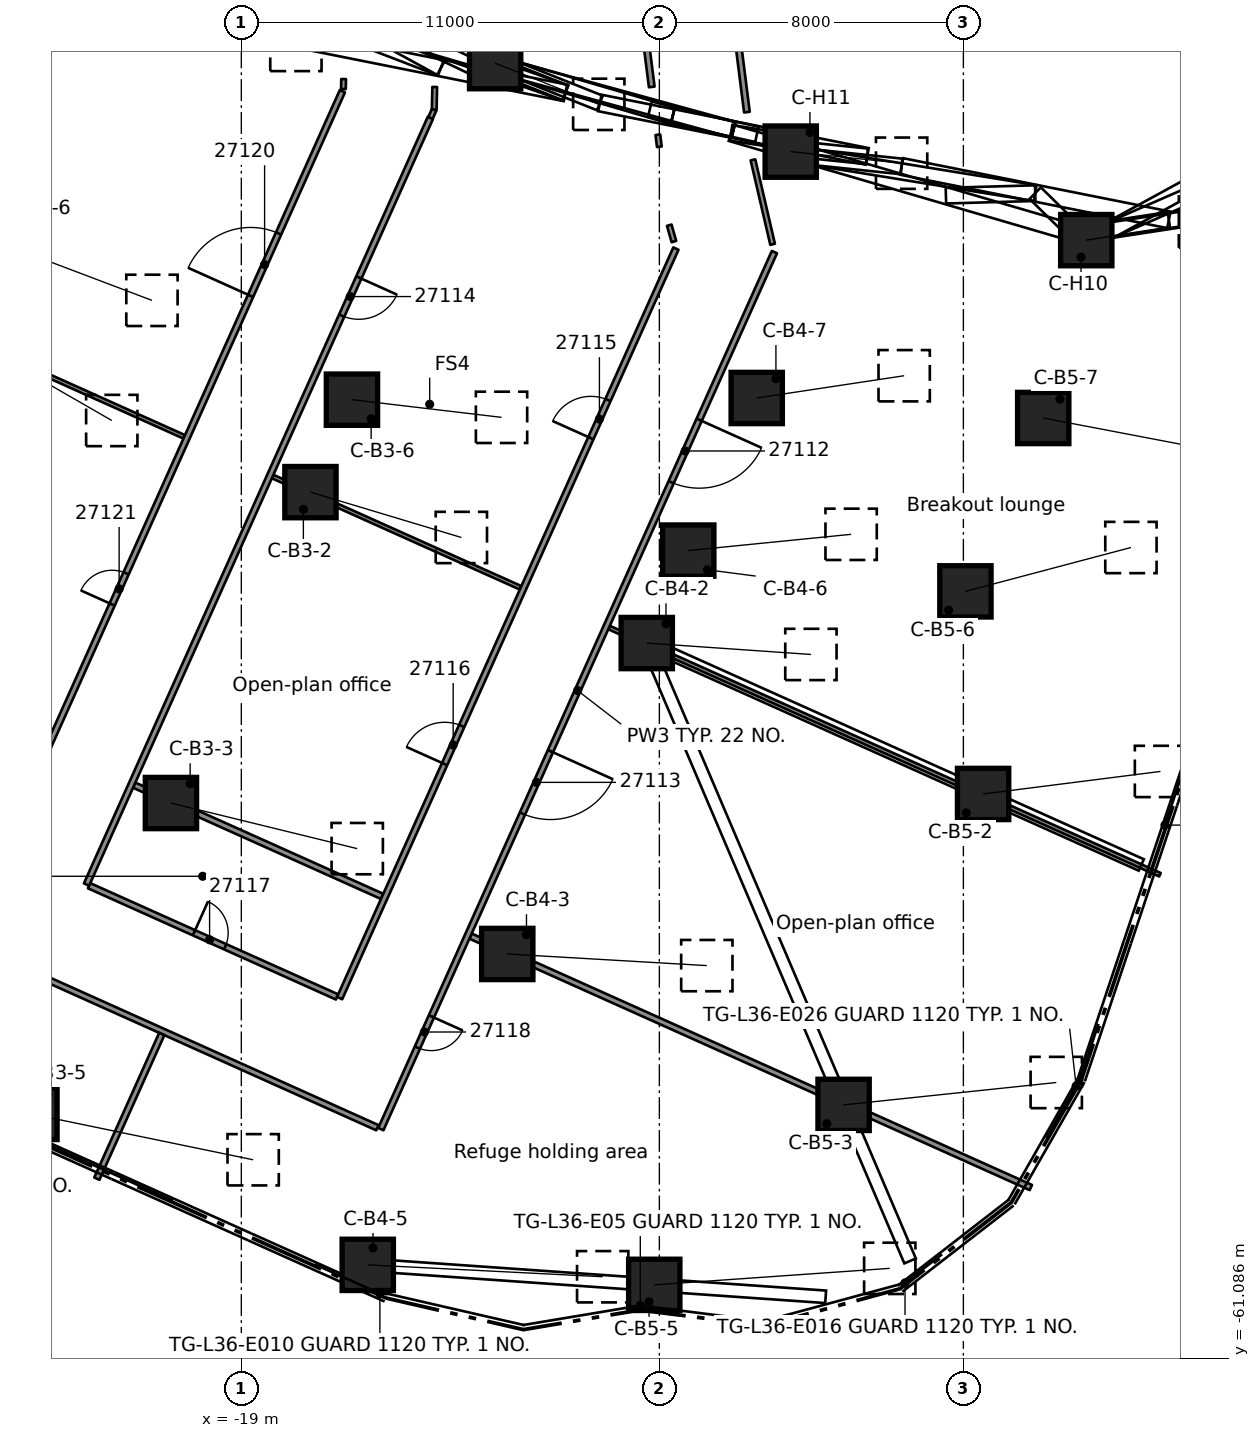
"""IFC4 building model, lengths in metres.
Left out: names, types, materials, properties, quantities, classifications, styles, units other than length and angle.
Written with IfcOpenShell. Run it as: python <this file> out.ifc"""

import sys

from ifc_helpers import new_model, si_unit, direction, frame, frame_2d, origin, origin_2d, place, context, subcontext, project, spatial, rectangle, extrude, element, fill, save


model = new_model("IFC4")
c1 = context("Model", 3, precision=1e-05, world=origin(), true_north=direction((0.0, 1.0)))
c2 = subcontext(c1, "Body", "Model", "MODEL_VIEW")
j1 = project(units=[si_unit("LENGTHUNIT", "METRE"), si_unit("PLANEANGLEUNIT", "RADIAN")], contexts=[c1])
p1 = place(None, origin())
s1 = spatial("IfcSite", under=j1, at=p1, CompositionType="ELEMENT")
p2 = place(p1, origin())
s2 = spatial("IfcBuilding", under=s1, at=p2, CompositionType="ELEMENT")
p3 = place(p2, frame((0.0, 0.0, 141.2)))
s3 = spatial("IfcBuildingStorey", under=s2, at=p3, CompositionType="ELEMENT", Elevation=141.2)
p4 = place(p3, frame((-26.031, -34.318, 0.527), z_axis=(0.676490609921, -0.389588552923, 0.624964970314), x_axis=(0.499054836626, 0.866570406857, 0.0)))
e1 = element("IfcColumn", 1, at=p4, inside=s3, PredefinedType="COLUMN", context=c2, shape_type="SweptSolid", body=[
    extrude(rectangle(XDim=1.35, YDim=1.35, at=origin_2d()), origin(), (0.0, 0.0, 1.0), 5.354),
])
p5 = place(p3, frame((-24.939, -31.885, 0.506), z_axis=(0.700899962867, -0.265342063263, 0.66206708989), x_axis=(0.354051617302, 0.935225883028, 0.0)))
e2 = element("IfcColumn", 2, at=p5, inside=s3, PredefinedType="COLUMN", context=c2, shape_type="SweptSolid", body=[
    extrude(rectangle(XDim=1.35, YDim=1.35, at=origin_2d()), origin(), (0.0, 0.0, 1.0), 5.118),
])
p6 = place(p3, frame((-17.181, -38.289, 0.525), z_axis=(0.744966037847, -0.223787522959, 0.628446296053), x_axis=(0.287698999339, 0.957720880935, 0.0)))
e3 = element("IfcColumn", 3, at=p6, inside=s3, PredefinedType="COLUMN", context=c2, shape_type="SweptSolid", body=[
    extrude(rectangle(XDim=1.35, YDim=1.35, at=origin_2d()), origin(), (0.0, 0.0, 1.0), 5.33),
])
p7 = place(p3, frame((-20.852, -46.469, 0.567), z_axis=(0.815419612681, -0.199600946079, 0.543369411707), x_axis=(0.237763481312, 0.971323080625, 0.0)))
e4 = element("IfcColumn", 4, at=p7, inside=s3, PredefinedType="COLUMN", context=c2, shape_type="SweptSolid", body=[
    extrude(rectangle(XDim=1.35, YDim=1.35, at=origin_2d()), origin(), (0.0, 0.0, 1.0), 6.012),
])
p8 = place(p3, frame((-24.523, -54.65, 0.594), z_axis=(0.862005289153, -0.178201629077, 0.474543002126), x_axis=(0.202448404588, 0.979292930374, 0.0)))
e5 = element("IfcColumn", 5, at=p8, inside=s3, PredefinedType="COLUMN", context=c2, shape_type="SweptSolid", body=[
    extrude(rectangle(XDim=1.35, YDim=1.35, at=origin_2d()), origin(), (0.0, 0.0, 1.0), 6.768),
])
p9 = place(p3, frame((-16.089, -35.856, 0.514), z_axis=(0.756400050479, -0.089377378499, 0.647974264804), x_axis=(0.117345163005, 0.993091190536, 0.0)))
e6 = element("IfcColumn", 6, at=p9, inside=s3, PredefinedType="COLUMN", context=c2, shape_type="SweptSolid", body=[
    extrude(rectangle(XDim=1.35, YDim=1.35, at=origin_2d()), origin(), (0.0, 0.0, 1.0), 5.204),
])
p10 = place(p3, frame((-8.331, -42.26, 0.535), z_axis=(0.790766933588, -0.05493485735, 0.60964728999), x_axis=(0.069303320034, 0.997595634429, 0.0)))
e7 = element("IfcColumn", 7, at=p10, inside=s3, PredefinedType="COLUMN", context=c2, shape_type="SweptSolid", body=[
    extrude(rectangle(XDim=1.35, YDim=1.35, at=origin_2d()), origin(), (0.0, 0.0, 1.0), 5.462),
])
p11 = place(p3, frame((-12.002, -50.441, 0.574), z_axis=(0.84914253523, -0.049508310358, 0.525838266075), x_axis=(0.0582050414, 0.998304649471, 0.0)))
e8 = element("IfcColumn", 8, at=p11, inside=s3, PredefinedType="COLUMN", context=c2, shape_type="SweptSolid", body=[
    extrude(rectangle(XDim=1.35, YDim=1.35, at=origin_2d()), origin(), (0.0, 0.0, 1.0), 6.184),
])
p12 = place(p3, frame((-15.673, -58.621, 0.6), z_axis=(0.887129480144, -0.044913513685, 0.459330013986), x_axis=(0.050563152588, 0.998720865708, 0.0)))
e9 = element("IfcColumn", 9, at=p12, inside=s3, PredefinedType="COLUMN", context=c2, shape_type="SweptSolid", body=[
    extrude(rectangle(XDim=1.35, YDim=1.35, at=origin_2d()), origin(), (0.0, 0.0, 1.0), 6.969),
])
p13 = place(p3, frame((-7.239, -39.827, 0.534), z_axis=(0.786948730103, 0.07860071357, 0.611991522829), x_axis=(-0.099385838219, 0.995048971238, 0.0)))
e10 = element("IfcColumn", 10, at=p13, inside=s3, PredefinedType="COLUMN", context=c2, shape_type="SweptSolid", body=[
    extrude(rectangle(XDim=1.35, YDim=1.35, at=origin_2d()), origin(), (0.0, 0.0, 1.0), 5.445),
])
p14 = place(p3, frame((-5.438, -35.812, 0.512), z_axis=(0.749479055417, 0.113185862887, 0.652280695663), x_axis=(-0.14932615089, 0.988787995811, 0.0)))
e11 = element("IfcColumn", 11, at=p14, inside=s3, PredefinedType="COLUMN", context=c2, shape_type="SweptSolid", body=[
    extrude(rectangle(XDim=1.35, YDim=1.35, at=origin_2d()), origin(), (0.0, 0.0, 1.0), 5.177),
])
p15 = place(p3, frame((0.519, -46.231, 0.553), z_axis=(0.812671730055, 0.103241612568, 0.57350311996), x_axis=(-0.12602683971, 0.992026832133, 0.0)))
e12 = element("IfcColumn", 12, at=p15, inside=s3, PredefinedType="COLUMN", context=c2, shape_type="SweptSolid", body=[
    extrude(rectangle(XDim=1.35, YDim=1.35, at=origin_2d()), origin(), (0.0, 0.0, 1.0), 5.744),
])
p16 = place(p3, frame((-3.152, -54.412, 0.585), z_axis=(0.862562236494, 0.090801966524, 0.497736266561), x_axis=(-0.104691559937, 0.994504739696, 0.0)))
e13 = element("IfcColumn", 13, at=p16, inside=s3, PredefinedType="COLUMN", context=c2, shape_type="SweptSolid", body=[
    extrude(rectangle(XDim=1.35, YDim=1.35, at=origin_2d()), origin(), (0.0, 0.0, 1.0), 6.488),
])
p17 = place(p3, frame((-8.134, -59.147, 0.6), z_axis=(0.886817690236, 0.062118813901, 0.45792536209), x_axis=(-0.069875666761, 0.997555708316, 0.0)))
e14 = element("IfcColumn", 14, at=p17, inside=s3, PredefinedType="COLUMN", context=c2, shape_type="SweptSolid", body=[
    extrude(rectangle(XDim=1.35, YDim=1.35, at=origin_2d()), origin(), (0.0, 0.0, 1.0), 6.988),
])
p18 = place(p3, frame((0.054, -40.9, 0.544), z_axis=(0.778816229467, 0.20633958406, 0.592342178786), x_axis=(-0.25610405903, 0.966649218149, 0.0)))
e15 = element("IfcColumn", 15, at=p18, inside=s3, PredefinedType="COLUMN", context=c2, shape_type="SweptSolid", body=[
    extrude(rectangle(XDim=1.35, YDim=1.35, at=origin_2d()), origin(), (0.0, 0.0, 1.0), 5.592),
])
p19 = place(p3, frame((2.101, -36.338, 0.594), z_axis=(0.863633920008, -0.164879186288, 0.476394066022), x_axis=(0.187526397263, 0.982259563623, 0.0)))
e16 = element("IfcColumn", 16, at=p19, inside=s3, PredefinedType="COLUMN", context=c2, shape_type="SweptSolid", body=[
    extrude(rectangle(XDim=1.35, YDim=1.35, at=origin_2d()), origin(), (0.0, 0.0, 1.0), 6.745),
])
p20 = place(p3, frame((3.234, -31.658, 0.451), z_axis=(0.661134708716, 0.100942539324, 0.74344569451), x_axis=(-0.150931663907, 0.988544198724, 0.0)))
e17 = element("IfcColumn", 17, at=p20, inside=s3, PredefinedType="COLUMN", context=c2, shape_type="SweptSolid", body=[
    extrude(rectangle(XDim=1.35, YDim=1.35, at=origin_2d()), origin(), (0.0, 0.0, 1.0), 4.704),
])
p21 = place(p3, frame((-4.543, -29.329, 0.431), z_axis=(0.634831676586, -0.066340760045, 0.769797145981), x_axis=(0.10393536505, 0.994584053709, 0.0)))
e18 = element("IfcColumn", 18, at=p21, inside=s3, PredefinedType="COLUMN", context=c2, shape_type="SweptSolid", body=[
    extrude(rectangle(XDim=1.35, YDim=1.35, at=origin_2d()), origin(), (0.0, 0.0, 1.0), 4.596),
])
p22 = place(p3, frame((-12.321, -27.001, 0.431), z_axis=(0.593235257024, -0.23580703144, 0.769718762762), x_axis=(0.369381674958, 0.929277772361, 0.0)))
e19 = element("IfcColumn", 19, at=p22, inside=s3, PredefinedType="COLUMN", context=c2, shape_type="SweptSolid", body=[
    extrude(rectangle(XDim=1.35, YDim=1.35, at=origin_2d()), origin(), (0.0, 0.0, 1.0), 4.597),
])
p23 = place(p3, frame((-20.098, -24.672, 0.451), z_axis=(0.538700406723, -0.396226891312, 0.743509329059), x_axis=(0.592510461213, 0.805562755689, 0.0)))
e20 = element("IfcColumn", 20, at=p23, inside=s3, PredefinedType="COLUMN", context=c2, shape_type="SweptSolid", body=[
    extrude(rectangle(XDim=1.35, YDim=1.35, at=origin_2d()), origin(), (0.0, 0.0, 1.0), 4.704),
])
p24 = place(p3, frame((-9.257, -19.284, 0.0), z_axis=(0.0, 0.0, 1.0), x_axis=(0.125703157539, -0.992067898979, 0.0)))
e21 = element("IfcWall", 21, at=p24, inside=s3, PredefinedType="PARTITIONING", context=c2, shape_type="SweptSolid", body=[
    extrude(rectangle(XDim=8.41, YDim=0.15, at=frame_2d((4.205, 0.0))), origin(), (0.0, 0.0, 1.0), 3.98),
])
p25 = place(p3, frame((-8.04, -28.885, 0.0), z_axis=(0.0, 0.0, 1.0), x_axis=(0.12573301006, -0.992064115963, 0.0)))
e22 = element("IfcWall", 22, at=p25, inside=s3, PredefinedType="PARTITIONING", context=c2, shape_type="SweptSolid", body=[
    extrude(rectangle(XDim=0.318, YDim=0.125, at=frame_2d((0.159, 0.0))), origin(), (0.0, 0.0, 1.0), 3.98),
])
p26 = place(p3, frame((-7.739, -31.265, 0.0), z_axis=(0.0, 0.0, 1.0), x_axis=(0.272417640043, -0.962179104633, 0.0)))
e23 = element("IfcWall", 23, at=p26, inside=s3, PredefinedType="PARTITIONING", context=c2, shape_type="SweptSolid", body=[
    extrude(rectangle(XDim=0.448, YDim=0.125, at=frame_2d((0.224, 0.0))), origin(), (0.0, 0.0, 1.0), 3.98),
])
p27 = place(p3, frame((-5.537, -29.545, 0.0), z_axis=(0.0, 0.0, 1.0), x_axis=(0.22654653271, -0.974000343181, 0.0)))
e24 = element("IfcWall", 24, at=p27, inside=s3, PredefinedType="PARTITIONING", context=c2, shape_type="SweptSolid", body=[
    extrude(rectangle(XDim=2.282, YDim=0.125, at=frame_2d((1.141, 0.0))), origin(), (0.0, 0.0, 1.0), 3.98),
])
p28 = place(p3, frame((-6.963, -18.288, 0.0), z_axis=(0.0, 0.0, 1.0), x_axis=(0.125655911579, -0.992073884287, 0.0)))
e25 = element("IfcWall", 25, at=p28, inside=s3, PredefinedType="PARTITIONING", context=c2, shape_type="SweptSolid", body=[
    extrude(rectangle(XDim=10.082, YDim=0.15, at=frame_2d((5.041, 0.0))), origin(), (0.0, 0.0, 1.0), 3.98),
])
p29 = place(p3, frame((-26.302, -50.126, 0.0), z_axis=(0.0, 0.0, 1.0), x_axis=(0.912247840601, -0.4096387156, 0.0)))
e26 = element("IfcWall", 26, at=p29, inside=s3, PredefinedType="PARTITIONING", context=c2, shape_type="SweptSolid", body=[
    extrude(rectangle(XDim=11.93, YDim=0.15, at=frame_2d((5.965, 0.0))), origin(), (0.0, 0.0, 1.0), 3.98),
])
p30 = place(p3, frame((-23.006, -48.645, 0.0), z_axis=(0.0, 0.0, 1.0), x_axis=(0.912436356284, -0.409218640499, 0.0)))
e27 = element("IfcWall", 27, at=p30, inside=s3, PredefinedType="PARTITIONING", context=c2, shape_type="SweptSolid", body=[
    extrude(rectangle(XDim=7.15, YDim=0.15, at=frame_2d((3.575, 0.0))), origin(), (0.0, 0.0, 1.0), 3.98),
])
p31 = place(p30, frame((3.025, 0.0, 0.0)))
e28 = element("IfcOpeningElement", 28, at=p31, cuts=e27, PredefinedType="OPENING", context=c2, shape_type="SweptSolid", body=[
    extrude(rectangle(XDim=0.9, YDim=2.1, at=frame_2d((0.45, 1.05))), frame((0.0, 0.085, 0.0), z_axis=(0.0, -1.0, 0.0), x_axis=(1.0, 0.0, 0.0)), (0.0, 0.0, 1.0), 0.17),
])
p32 = place(p3, frame((-21.819, -45.999, 0.0), z_axis=(0.0, 0.0, 1.0), x_axis=(0.912385356139, -0.409332336742, 0.0)))
e29 = element("IfcWall", 29, at=p32, inside=s3, PredefinedType="PARTITIONING", context=c2, shape_type="SweptSolid", body=[
    extrude(rectangle(XDim=7.151, YDim=0.15, at=frame_2d((3.575, 0.0))), origin(), (0.0, 0.0, 1.0), 3.98),
])
p33 = place(p3, frame((-12.968, -49.971, 0.0), z_axis=(0.0, 0.0, 1.0), x_axis=(0.912368475421, -0.40936996111, 0.0)))
e30 = element("IfcWall", 30, at=p33, inside=s3, PredefinedType="PARTITIONING", context=c2, shape_type="SweptSolid", body=[
    extrude(rectangle(XDim=16.159, YDim=0.15, at=frame_2d((8.08, 0.0))), origin(), (0.0, 0.0, 1.0), 3.98),
])
p34 = place(p3, frame((-35.67, -30.029, 0.0), z_axis=(0.0, 0.0, 1.0), x_axis=(0.912385851381, -0.409331232867, 0.0)))
e31 = element("IfcWall", 31, at=p34, inside=s3, PredefinedType="PARTITIONING", context=c2, shape_type="SweptSolid", body=[
    extrude(rectangle(XDim=16.625, YDim=0.1, at=frame_2d((8.312, 0.0))), origin(), (0.0, 0.0, 1.0), 3.98),
])
p35 = place(p3, frame((-18.175, -37.879, 0.0), z_axis=(0.0, 0.0, 1.0), x_axis=(0.912356746217, -0.409396101145, 0.0)))
e32 = element("IfcWall", 32, at=p35, inside=s3, PredefinedType="PARTITIONING", context=c2, shape_type="SweptSolid", body=[
    extrude(rectangle(XDim=7.15, YDim=0.1, at=frame_2d((3.575, 0.0))), origin(), (0.0, 0.0, 1.0), 3.98),
])
p36 = place(p3, frame((-9.325, -41.851, 0.0), z_axis=(0.0, 0.0, 1.0), x_axis=(0.91237401084, -0.40935762402, 0.0)))
e33 = element("IfcWall", 33, at=p36, inside=s3, PredefinedType="PARTITIONING", context=c2, shape_type="SweptSolid", body=[
    extrude(rectangle(XDim=15.89, YDim=0.1, at=frame_2d((7.945, 0.0))), origin(), (0.0, 0.0, 1.0), 3.98),
])
p37 = place(p3, frame((-4.972, -31.973, 0.0), z_axis=(0.0, 0.0, 1.0), x_axis=(-0.409473513005, -0.912322005734, 0.0)))
e34 = element("IfcWall", 34, at=p37, inside=s3, PredefinedType="PARTITIONING", context=c2, shape_type="SweptSolid", body=[
    extrude(rectangle(XDim=25.294, YDim=0.15, at=frame_2d((12.647, 0.0))), origin(), (0.0, 0.0, 1.0), 3.98),
])
p38 = place(p37, frame((4.836, 0.0, 0.0)))
e35 = element("IfcOpeningElement", 35, at=p38, cuts=e34, PredefinedType="OPENING", context=c2, shape_type="SweptSolid", body=[
    extrude(rectangle(XDim=1.8, YDim=2.1, at=frame_2d((0.9, 1.05))), frame((0.0, 0.085, 0.0), z_axis=(0.0, -1.0, 0.0), x_axis=(1.0, 0.0, 0.0)), (0.0, 0.0, 1.0), 0.17),
])
p39 = place(p37, frame((14.394, 0.0, 0.0)))
e36 = element("IfcOpeningElement", 36, at=p39, cuts=e34, PredefinedType="OPENING", context=c2, shape_type="SweptSolid", body=[
    extrude(rectangle(XDim=1.8, YDim=2.1, at=frame_2d((0.9, 1.05))), frame((0.0, 0.085, 0.0), z_axis=(0.0, -1.0, 0.0), x_axis=(1.0, 0.0, 0.0)), (0.0, 0.0, 1.0), 0.17),
])
p40 = place(p37, frame((22.043, 0.0, 0.0)))
e37 = element("IfcOpeningElement", 37, at=p40, cuts=e34, PredefinedType="OPENING", context=c2, shape_type="SweptSolid", body=[
    extrude(rectangle(XDim=0.9, YDim=2.1, at=frame_2d((0.45, 1.05))), frame((0.0, 0.085, 0.0), z_axis=(0.0, -1.0, 0.0), x_axis=(1.0, 0.0, 0.0)), (0.0, 0.0, 1.0), 0.17),
])
p41 = place(p3, frame((-16.414, -51.602, 0.0), z_axis=(0.0, 0.0, 1.0), x_axis=(0.409428490452, 0.912342211676, 0.0)))
e38 = element("IfcWall", 38, at=p41, inside=s3, PredefinedType="PARTITIONING", context=c2, shape_type="SweptSolid", body=[
    extrude(rectangle(XDim=21.616, YDim=0.15, at=frame_2d((10.808, 0.0))), origin(), (0.0, 0.0, 1.0), 3.98),
])
p42 = place(p41, frame((16.149, 0.0, 0.0)))
e39 = element("IfcOpeningElement", 39, at=p42, cuts=e38, PredefinedType="OPENING", context=c2, shape_type="SweptSolid", body=[
    extrude(rectangle(XDim=1.1, YDim=2.1, at=frame_2d((0.55, 1.05))), frame((0.0, 0.085, 0.0), z_axis=(0.0, -1.0, 0.0), x_axis=(1.0, 0.0, 0.0)), (0.0, 0.0, 1.0), 0.17),
])
p43 = place(p41, frame((6.749, 0.0, 0.0)))
e40 = element("IfcOpeningElement", 40, at=p43, cuts=e38, PredefinedType="OPENING", context=c2, shape_type="SweptSolid", body=[
    extrude(rectangle(XDim=1.1, YDim=2.1, at=frame_2d((0.55, 1.05))), frame((0.0, 0.085, 0.0), z_axis=(0.0, -1.0, 0.0), x_axis=(1.0, 0.0, 0.0)), (0.0, 0.0, 1.0), 0.17),
])
p44 = place(p3, frame((-22.802, -56.354, 0.0), z_axis=(0.0, 0.0, 1.0), x_axis=(0.409348042989, 0.91237830953, 0.0)))
e41 = element("IfcWall", 41, at=p44, inside=s3, PredefinedType="PARTITIONING", context=c2, shape_type="SweptSolid", body=[
    extrude(rectangle(XDim=4.175, YDim=0.15, at=frame_2d((2.087, 0.0))), origin(), (0.0, 0.0, 1.0), 3.98),
])
p45 = place(p3, frame((-14.024, -28.445, 0.0), z_axis=(0.0, 0.0, 1.0), x_axis=(0.409947870427, 0.912108953762, 0.0)))
e42 = element("IfcWall", 42, at=p45, inside=s3, PredefinedType="PARTITIONING", context=c2, shape_type="SweptSolid", body=[
    extrude(rectangle(XDim=0.244, YDim=0.125, at=frame_2d((0.122, 0.0))), origin(), (0.0, 0.0, 1.0), 3.98),
])
p46 = place(p3, frame((-14.026, -28.444, 0.0), z_axis=(0.0, 0.0, 1.0), x_axis=(-0.409297204015, -0.912401117264, 0.0)))
e43 = element("IfcWall", 43, at=p46, inside=s3, PredefinedType="PARTITIONING", context=c2, shape_type="SweptSolid", body=[
    extrude(rectangle(XDim=22.106, YDim=0.15, at=frame_2d((11.053, 0.0))), origin(), (0.0, 0.0, 1.0), 3.98),
])
p47 = place(p46, frame((4.6, 0.0, 0.0)))
e44 = element("IfcOpeningElement", 44, at=p47, cuts=e43, PredefinedType="OPENING", context=c2, shape_type="SweptSolid", body=[
    extrude(rectangle(XDim=1.1, YDim=2.1, at=frame_2d((0.55, 1.05))), frame((0.0, 0.085, 0.0), z_axis=(0.0, -1.0, 0.0), x_axis=(1.0, 0.0, 0.0)), (0.0, 0.0, 1.0), 0.17),
])
p48 = place(p3, frame((-25.511, -48.179, 0.0), z_axis=(0.0, 0.0, 1.0), x_axis=(0.409355672169, 0.912374886581, 0.0)))
e45 = element("IfcWall", 45, at=p48, inside=s3, PredefinedType="PARTITIONING", context=c2, shape_type="SweptSolid", body=[
    extrude(rectangle(XDim=22.401, YDim=0.15, at=frame_2d((11.2, 0.0))), origin(), (0.0, 0.0, 1.0), 3.98),
])
p49 = place(p48, frame((1.35, 0.0, 0.0)))
e46 = element("IfcOpeningElement", 46, at=p49, cuts=e45, PredefinedType="OPENING", context=c2, shape_type="SweptSolid", body=[
    extrude(rectangle(XDim=0.9, YDim=2.1, at=frame_2d((0.45, 1.05))), frame((0.0, 0.085, 0.0), z_axis=(0.0, -1.0, 0.0), x_axis=(1.0, 0.0, 0.0)), (0.0, 0.0, 1.0), 0.17),
])
p50 = place(p48, frame((16.501, 0.0, 0.0)))
e47 = element("IfcOpeningElement", 47, at=p50, cuts=e45, PredefinedType="OPENING", context=c2, shape_type="SweptSolid", body=[
    extrude(rectangle(XDim=1.8, YDim=2.1, at=frame_2d((0.9, 1.05))), frame((0.0, 0.085, 0.0), z_axis=(0.0, -1.0, 0.0), x_axis=(1.0, 0.0, 0.0)), (0.0, 0.0, 1.0), 0.17),
])
p51 = place(p48, frame((7.601, 0.0, 0.0)))
e48 = element("IfcOpeningElement", 48, at=p51, cuts=e45, PredefinedType="OPENING", context=c2, shape_type="SweptSolid", body=[
    extrude(rectangle(XDim=0.9, YDim=2.1, at=frame_2d((0.45, 1.05))), frame((0.0, 0.085, 0.0), z_axis=(0.0, -1.0, 0.0), x_axis=(1.0, 0.0, 0.0)), (0.0, 0.0, 1.0), 0.17),
])
p52 = place(p3, frame((-13.924, -28.223, 0.0), z_axis=(0.0, 0.0, 1.0), x_axis=(0.022152953645, 0.99975459321, 0.0)))
e49 = element("IfcWall", 49, at=p52, inside=s3, PredefinedType="PARTITIONING", context=c2, shape_type="SweptSolid", body=[
    extrude(rectangle(XDim=0.595, YDim=0.125, at=frame_2d((0.298, 0.0))), origin(), (0.0, 0.0, 1.0), 3.98),
])
p53 = place(p3, frame((-16.314, -27.684, 0.0), z_axis=(0.0, 0.0, 1.0), x_axis=(0.022175691441, 0.999754089118, 0.0)))
e50 = element("IfcWall", 50, at=p53, inside=s3, PredefinedType="PARTITIONING", context=c2, shape_type="SweptSolid", body=[
    extrude(rectangle(XDim=0.264, YDim=0.125, at=frame_2d((0.132, 0.0))), origin(), (0.0, 0.0, 1.0), 3.98),
])
p54 = place(p38, origin())
e51 = element("IfcDoor", 51, at=p54, inside=s3, OperationType="DOUBLE_DOOR_SINGLE_SWING", PredefinedType="DOOR", context=c2, shape_type="SweptSolid", body=[
    extrude(rectangle(XDim=1.8, YDim=2.1, at=frame_2d((0.9, 1.05))), frame((0.0, 0.025, 0.0), z_axis=(0.0, -1.0, 0.0), x_axis=(1.0, 0.0, 0.0)), (0.0, 0.0, 1.0), 0.05),
])
fill(e35, e51)
p55 = place(p39, origin())
e52 = element("IfcDoor", 52, at=p55, inside=s3, OperationType="DOUBLE_DOOR_SINGLE_SWING", PredefinedType="DOOR", context=c2, shape_type="SweptSolid", body=[
    extrude(rectangle(XDim=1.8, YDim=2.1, at=frame_2d((0.9, 1.05))), frame((0.0, 0.025, 0.0), z_axis=(0.0, -1.0, 0.0), x_axis=(1.0, 0.0, 0.0)), (0.0, 0.0, 1.0), 0.05),
])
fill(e36, e52)
p56 = place(p47, origin())
e53 = element("IfcDoor", 53, at=p56, inside=s3, OperationType="SINGLE_SWING_LEFT", PredefinedType="DOOR", context=c2, shape_type="SweptSolid", body=[
    extrude(rectangle(XDim=1.1, YDim=2.1, at=frame_2d((0.55, 1.05))), frame((0.0, 0.025, 0.0), z_axis=(0.0, -1.0, 0.0), x_axis=(1.0, 0.0, 0.0)), (0.0, 0.0, 1.0), 0.05),
])
fill(e44, e53)
p57 = place(p42, origin())
e54 = element("IfcDoor", 54, at=p57, inside=s3, OperationType="SINGLE_SWING_RIGHT", PredefinedType="DOOR", context=c2, shape_type="SweptSolid", body=[
    extrude(rectangle(XDim=1.1, YDim=2.1, at=frame_2d((0.55, 1.05))), frame((0.0, 0.025, 0.0), z_axis=(0.0, -1.0, 0.0), x_axis=(1.0, 0.0, 0.0)), (0.0, 0.0, 1.0), 0.05),
])
fill(e39, e54)
p58 = place(p43, origin())
e55 = element("IfcDoor", 55, at=p58, inside=s3, OperationType="SINGLE_SWING_LEFT", PredefinedType="DOOR", context=c2, shape_type="SweptSolid", body=[
    extrude(rectangle(XDim=1.1, YDim=2.1, at=frame_2d((0.55, 1.05))), frame((0.0, 0.025, 0.0), z_axis=(0.0, -1.0, 0.0), x_axis=(1.0, 0.0, 0.0)), (0.0, 0.0, 1.0), 0.05),
])
fill(e40, e55)
p59 = place(p31, origin())
e56 = element("IfcDoor", 56, at=p59, inside=s3, OperationType="SINGLE_SWING_LEFT", PredefinedType="DOOR", context=c2, shape_type="SweptSolid", body=[
    extrude(rectangle(XDim=0.9, YDim=2.1, at=frame_2d((0.45, 1.05))), frame((0.0, 0.025, 0.0), z_axis=(0.0, -1.0, 0.0), x_axis=(1.0, 0.0, 0.0)), (0.0, 0.0, 1.0), 0.05),
])
fill(e28, e56)
p60 = place(p40, origin())
e57 = element("IfcDoor", 57, at=p60, inside=s3, OperationType="SINGLE_SWING_RIGHT", PredefinedType="DOOR", context=c2, shape_type="SweptSolid", body=[
    extrude(rectangle(XDim=0.9, YDim=2.1, at=frame_2d((0.45, 1.05))), frame((0.0, 0.025, 0.0), z_axis=(0.0, -1.0, 0.0), x_axis=(1.0, 0.0, 0.0)), (0.0, 0.0, 1.0), 0.05),
])
fill(e37, e57)
p61 = place(p50, origin())
e58 = element("IfcDoor", 58, at=p61, inside=s3, OperationType="DOUBLE_DOOR_SINGLE_SWING", PredefinedType="DOOR", context=c2, shape_type="SweptSolid", body=[
    extrude(rectangle(XDim=1.8, YDim=2.1, at=frame_2d((0.9, 1.05))), frame((0.0, 0.025, 0.0), z_axis=(0.0, -1.0, 0.0), x_axis=(1.0, 0.0, 0.0)), (0.0, 0.0, 1.0), 0.05),
])
fill(e47, e58)
p62 = place(p51, origin())
e59 = element("IfcDoor", 59, at=p62, inside=s3, OperationType="SINGLE_SWING_LEFT", PredefinedType="DOOR", context=c2, shape_type="SweptSolid", body=[
    extrude(rectangle(XDim=0.9, YDim=2.1, at=frame_2d((0.45, 1.05))), frame((0.0, 0.025, 0.0), z_axis=(0.0, -1.0, 0.0), x_axis=(1.0, 0.0, 0.0)), (0.0, 0.0, 1.0), 0.05),
])
fill(e48, e59)
save(model, sys.argv[1])
